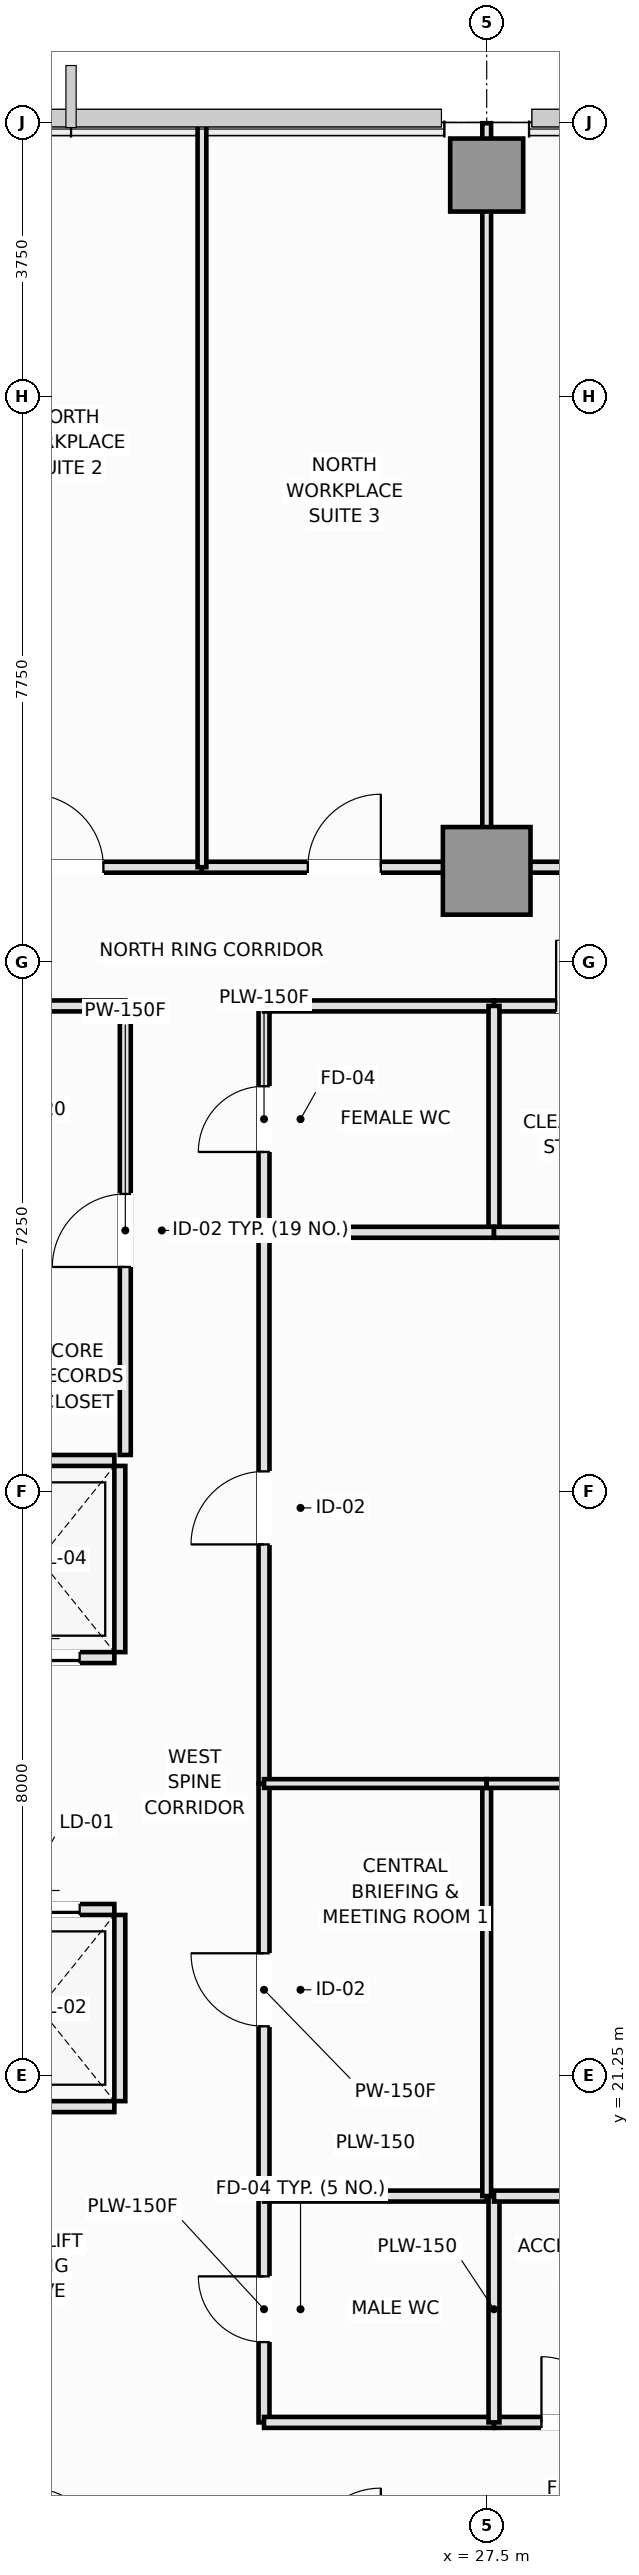
"""IFC4 building model, lengths in metres.
Left out: names, types, materials, properties, quantities, classifications, styles, units other than length and angle.
Written with IfcOpenShell. Run it as: python <this file> out.ifc"""

import sys

from ifc_helpers import new_model, si_unit, direction, frame, frame_2d, origin, origin_2d, place, context, subcontext, project, spatial, rectangle, extrude, element, fill, save


model = new_model("IFC4")
c1 = context("Model", 3, precision=1e-05, world=origin(), true_north=direction((0.0, 1.0)))
c2 = subcontext(c1, "Body", "Model", "MODEL_VIEW")
j1 = project(units=[si_unit("LENGTHUNIT", "METRE"), si_unit("PLANEANGLEUNIT", "RADIAN")], contexts=[c1])
p1 = place(None, origin())
s1 = spatial("IfcSite", under=j1, at=p1, CompositionType="ELEMENT")
p2 = place(p1, origin())
s2 = spatial("IfcBuilding", under=s1, at=p2, CompositionType="ELEMENT")
p3 = place(p2, frame((0.0, 0.0, 57.55)))
s3 = spatial("IfcBuildingStorey", under=s2, at=p3, CompositionType="ELEMENT", Elevation=57.55)
p4 = place(p3, frame((27.5, 37.75, 0.0), z_axis=(0.0, 0.0, 1.0), x_axis=(1.0, 0.0, 0.0)))
e1 = element("IfcColumn", 1, at=p4, inside=s3, PredefinedType="COLUMN", context=c2, shape_type="SweptSolid", body=[
    extrude(rectangle(XDim=1.2, YDim=1.2, at=origin_2d()), origin(), (0.0, 0.0, 1.0), 3.55),
])
p5 = place(p3, frame((27.5, 47.28, 0.0), z_axis=(0.0, 0.0, 1.0), x_axis=(1.0, 0.0, 0.0)))
e2 = element("IfcColumn", 2, at=p5, inside=s3, PredefinedType="COLUMN", context=c2, shape_type="SweptSolid", body=[
    extrude(rectangle(XDim=1.0, YDim=1.0, at=origin_2d()), origin(), (0.0, 0.0, 1.0), 3.55),
])
p6 = place(p3, frame((20.35, 20.825, 0.0), z_axis=(0.0, 0.0, 1.0), x_axis=(1.0, 0.0, 0.0)))
e3 = element("IfcWall", 3, at=p6, inside=s3, PredefinedType="PARTITIONING", context=c2, shape_type="SweptSolid", body=[
    extrude(rectangle(XDim=2.05, YDim=0.15, at=frame_2d((1.025, 0.0))), origin(), (0.0, 0.0, 1.0), 3.37),
])
p7 = place(p3, frame((20.35, 23.525, 0.0), z_axis=(0.0, 0.0, 1.0), x_axis=(1.0, 0.0, 0.0)))
e4 = element("IfcWall", 4, at=p7, inside=s3, PredefinedType="PARTITIONING", context=c2, shape_type="SweptSolid", body=[
    extrude(rectangle(XDim=2.05, YDim=0.15, at=frame_2d((1.025, 0.0))), origin(), (0.0, 0.0, 1.0), 3.37),
])
p8 = place(p7, frame((0.475, 0.0, 0.0)))
e5 = element("IfcOpeningElement", 5, at=p8, cuts=e4, PredefinedType="OPENING", context=c2, shape_type="SweptSolid", body=[
    extrude(rectangle(XDim=1.1, YDim=2.2, at=frame_2d((0.55, 1.1))), frame((0.0, 0.085, 0.0), z_axis=(0.0, -1.0, 0.0), x_axis=(1.0, 0.0, 0.0)), (0.0, 0.0, 1.0), 0.17),
])
p9 = place(p3, frame((22.475, 20.9, 0.0), z_axis=(0.0, 0.0, 1.0), x_axis=(0.0, 1.0, 0.0)))
e6 = element("IfcWall", 6, at=p9, inside=s3, PredefinedType="PARTITIONING", context=c2, shape_type="SweptSolid", body=[
    extrude(rectangle(XDim=2.55, YDim=0.15, at=frame_2d((1.275, 0.0))), origin(), (0.0, 0.0, 1.0), 3.37),
])
p10 = place(p3, frame((20.35, 26.975, 0.0), z_axis=(0.0, 0.0, 1.0), x_axis=(1.0, 0.0, 0.0)))
e7 = element("IfcWall", 7, at=p10, inside=s3, PredefinedType="PARTITIONING", context=c2, shape_type="SweptSolid", body=[
    extrude(rectangle(XDim=2.05, YDim=0.15, at=frame_2d((1.025, 0.0))), origin(), (0.0, 0.0, 1.0), 3.37),
])
p11 = place(p10, frame((0.475, 0.0, 0.0)))
e8 = element("IfcOpeningElement", 8, at=p11, cuts=e7, PredefinedType="OPENING", context=c2, shape_type="SweptSolid", body=[
    extrude(rectangle(XDim=1.1, YDim=2.2, at=frame_2d((0.55, 1.1))), frame((0.0, 0.085, 0.0), z_axis=(0.0, -1.0, 0.0), x_axis=(1.0, 0.0, 0.0)), (0.0, 0.0, 1.0), 0.17),
])
p12 = place(p3, frame((20.35, 29.675, 0.0), z_axis=(0.0, 0.0, 1.0), x_axis=(1.0, 0.0, 0.0)))
e9 = element("IfcWall", 9, at=p12, inside=s3, PredefinedType="PARTITIONING", context=c2, shape_type="SweptSolid", body=[
    extrude(rectangle(XDim=2.05, YDim=0.15, at=frame_2d((1.025, 0.0))), origin(), (0.0, 0.0, 1.0), 3.37),
])
p13 = place(p3, frame((22.475, 27.05, 0.0), z_axis=(0.0, 0.0, 1.0), x_axis=(0.0, 1.0, 0.0)))
e10 = element("IfcWall", 10, at=p13, inside=s3, PredefinedType="PARTITIONING", context=c2, shape_type="SweptSolid", body=[
    extrude(rectangle(XDim=2.55, YDim=0.15, at=frame_2d((1.275, 0.0))), origin(), (0.0, 0.0, 1.0), 3.37),
])
p14 = place(p3, frame((22.55, 29.75, 0.0), z_axis=(0.0, 0.0, 1.0), x_axis=(0.0, 1.0, 0.0)))
e11 = element("IfcWall", 11, at=p14, inside=s3, PredefinedType="PARTITIONING", context=c2, shape_type="SweptSolid", body=[
    extrude(rectangle(XDim=6.15, YDim=0.15, at=frame_2d((3.075, 0.0))), origin(), (0.0, 0.0, 1.0), 3.01),
])
p15 = place(p14, frame((2.575, 0.0, 0.0)))
e12 = element("IfcOpeningElement", 12, at=p15, cuts=e11, PredefinedType="OPENING", context=c2, shape_type="SweptSolid", body=[
    extrude(rectangle(XDim=1.0, YDim=2.15, at=frame_2d((0.5, 1.075))), frame((0.0, 0.085, 0.0), z_axis=(0.0, -1.0, 0.0), x_axis=(1.0, 0.0, 0.0)), (0.0, 0.0, 1.0), 0.17),
])
p16 = place(p3, frame((24.45, 16.5, 0.0), z_axis=(0.0, 0.0, 1.0), x_axis=(0.0, 1.0, 0.0)))
e13 = element("IfcWall", 13, at=p16, inside=s3, PredefinedType="PLUMBINGWALL", context=c2, shape_type="SweptSolid", body=[
    extrude(rectangle(XDim=3.1, YDim=0.15, at=frame_2d((1.55, 0.0))), origin(), (0.0, 0.0, 1.0), 3.37),
])
p17 = place(p16, frame((1.1, 0.0, 0.0)))
e14 = element("IfcOpeningElement", 14, at=p17, cuts=e13, PredefinedType="OPENING", context=c2, shape_type="SweptSolid", body=[
    extrude(rectangle(XDim=0.9, YDim=2.1, at=frame_2d((0.45, 1.05))), frame((0.0, 0.085, 0.0), z_axis=(0.0, -1.0, 0.0), x_axis=(1.0, 0.0, 0.0)), (0.0, 0.0, 1.0), 0.17),
])
p18 = place(p3, frame((24.45, 32.8, 0.0), z_axis=(0.0, 0.0, 1.0), x_axis=(0.0, 1.0, 0.0)))
e15 = element("IfcWall", 15, at=p18, inside=s3, PredefinedType="PLUMBINGWALL", context=c2, shape_type="SweptSolid", body=[
    extrude(rectangle(XDim=3.1, YDim=0.15, at=frame_2d((1.55, 0.0))), origin(), (0.0, 0.0, 1.0), 3.37),
])
p19 = place(p18, frame((1.1, 0.0, 0.0)))
e16 = element("IfcOpeningElement", 16, at=p19, cuts=e15, PredefinedType="OPENING", context=c2, shape_type="SweptSolid", body=[
    extrude(rectangle(XDim=0.9, YDim=2.1, at=frame_2d((0.45, 1.05))), frame((0.0, 0.085, 0.0), z_axis=(0.0, -1.0, 0.0), x_axis=(1.0, 0.0, 0.0)), (0.0, 0.0, 1.0), 0.17),
])
p20 = place(p3, frame((24.45, 19.6, 0.0), z_axis=(0.0, 0.0, 1.0), x_axis=(0.0, 1.0, 0.0)))
e17 = element("IfcWall", 17, at=p20, inside=s3, PredefinedType="PARTITIONING", context=c2, shape_type="SweptSolid", body=[
    extrude(rectangle(XDim=5.65, YDim=0.15, at=frame_2d((2.825, 0.0))), origin(), (0.0, 0.0, 1.0), 3.37),
])
p21 = place(p20, frame((2.325, 0.0, 0.0)))
e18 = element("IfcOpeningElement", 18, at=p21, cuts=e17, PredefinedType="OPENING", context=c2, shape_type="SweptSolid", body=[
    extrude(rectangle(XDim=1.0, YDim=2.15, at=frame_2d((0.5, 1.075))), frame((0.0, 0.085, 0.0), z_axis=(0.0, -1.0, 0.0), x_axis=(1.0, 0.0, 0.0)), (0.0, 0.0, 1.0), 0.17),
])
p22 = place(p3, frame((24.45, 25.25, 0.0), z_axis=(0.0, 0.0, 1.0), x_axis=(0.0, 1.0, 0.0)))
e19 = element("IfcWall", 19, at=p22, inside=s3, PredefinedType="PARTITIONING", context=c2, shape_type="SweptSolid", body=[
    extrude(rectangle(XDim=7.55, YDim=0.15, at=frame_2d((3.775, 0.0))), origin(), (0.0, 0.0, 1.0), 3.37),
])
p23 = place(p22, frame((3.275, 0.0, 0.0)))
e20 = element("IfcOpeningElement", 20, at=p23, cuts=e19, PredefinedType="OPENING", context=c2, shape_type="SweptSolid", body=[
    extrude(rectangle(XDim=1.0, YDim=2.15, at=frame_2d((0.5, 1.075))), frame((0.0, 0.085, 0.0), z_axis=(0.0, -1.0, 0.0), x_axis=(1.0, 0.0, 0.0)), (0.0, 0.0, 1.0), 0.17),
])
p24 = place(p3, frame((24.45, 16.5, 0.0), z_axis=(0.0, 0.0, 1.0), x_axis=(1.0, 0.0, 0.0)))
e21 = element("IfcWall", 21, at=p24, inside=s3, PredefinedType="PLUMBINGWALL", context=c2, shape_type="SweptSolid", body=[
    extrude(rectangle(XDim=3.15, YDim=0.15, at=frame_2d((1.575, 0.0))), origin(), (0.0, 0.0, 1.0), 3.37),
])
p25 = place(p3, frame((27.6, 16.5, 0.0), z_axis=(0.0, 0.0, 1.0), x_axis=(1.0, 0.0, 0.0)))
e22 = element("IfcWall", 22, at=p25, inside=s3, PredefinedType="PLUMBINGWALL", context=c2, shape_type="SweptSolid", body=[
    extrude(rectangle(XDim=2.2, YDim=0.15, at=frame_2d((1.1, 0.0))), origin(), (0.0, 0.0, 1.0), 3.37),
])
p26 = place(p25, frame((0.65, 0.0, 0.0)))
e23 = element("IfcOpeningElement", 23, at=p26, cuts=e22, PredefinedType="OPENING", context=c2, shape_type="SweptSolid", body=[
    extrude(rectangle(XDim=0.9, YDim=2.1, at=frame_2d((0.45, 1.05))), frame((0.0, 0.085, 0.0), z_axis=(0.0, -1.0, 0.0), x_axis=(1.0, 0.0, 0.0)), (0.0, 0.0, 1.0), 0.17),
])
p27 = place(p3, frame((21.25, 35.9, 0.0), z_axis=(0.0, 0.0, 1.0), x_axis=(1.0, 0.0, 0.0)))
e24 = element("IfcWall", 24, at=p27, inside=s3, PredefinedType="PARTITIONING", context=c2, shape_type="SweptSolid", body=[
    extrude(rectangle(XDim=1.3, YDim=0.15, at=frame_2d((0.65, 0.0))), origin(), (0.0, 0.0, 1.0), 3.37),
])
p28 = place(p3, frame((24.45, 35.9, 0.0), z_axis=(0.0, 0.0, 1.0), x_axis=(1.0, 0.0, 0.0)))
e25 = element("IfcWall", 25, at=p28, inside=s3, PredefinedType="PLUMBINGWALL", context=c2, shape_type="SweptSolid", body=[
    extrude(rectangle(XDim=3.15, YDim=0.15, at=frame_2d((1.575, 0.0))), origin(), (0.0, 0.0, 1.0), 3.37),
])
p29 = place(p3, frame((27.6, 35.9, 0.0), z_axis=(0.0, 0.0, 1.0), x_axis=(1.0, 0.0, 0.0)))
e26 = element("IfcWall", 26, at=p29, inside=s3, PredefinedType="PLUMBINGWALL", context=c2, shape_type="SweptSolid", body=[
    extrude(rectangle(XDim=2.2, YDim=0.15, at=frame_2d((1.1, 0.0))), origin(), (0.0, 0.0, 1.0), 3.37),
])
p30 = place(p29, frame((0.851, 0.0, 0.0)))
e27 = element("IfcOpeningElement", 27, at=p30, cuts=e26, PredefinedType="OPENING", context=c2, shape_type="SweptSolid", body=[
    extrude(rectangle(XDim=0.9, YDim=2.1, at=frame_2d((0.45, 1.05))), frame((0.0, 0.085, 0.0), z_axis=(0.0, -1.0, 0.0), x_axis=(1.0, 0.0, 0.0)), (0.0, 0.0, 1.0), 0.17),
])
p31 = place(p3, frame((19.9, 37.8, 0.0), z_axis=(0.0, 0.0, 1.0), x_axis=(1.0, 0.0, 0.0)))
e28 = element("IfcWall", 28, at=p31, inside=s3, PredefinedType="PARTITIONING", context=c2, shape_type="SweptSolid", body=[
    extrude(rectangle(XDim=3.7, YDim=0.15, at=frame_2d((1.85, 0.0))), origin(), (0.0, 0.0, 1.0), 2.72),
])
p32 = place(p31, frame((1.35, 0.0, 0.0)))
e29 = element("IfcOpeningElement", 29, at=p32, cuts=e28, PredefinedType="OPENING", context=c2, shape_type="SweptSolid", body=[
    extrude(rectangle(XDim=1.0, YDim=2.15, at=frame_2d((0.5, 1.075))), frame((0.0, 0.085, 0.0), z_axis=(0.0, -1.0, 0.0), x_axis=(1.0, 0.0, 0.0)), (0.0, 0.0, 1.0), 0.17),
])
p33 = place(p3, frame((23.6, 37.8, 0.0), z_axis=(0.0, 0.0, 1.0), x_axis=(1.0, 0.0, 0.0)))
e30 = element("IfcWall", 30, at=p33, inside=s3, PredefinedType="PARTITIONING", context=c2, shape_type="SweptSolid", body=[
    extrude(rectangle(XDim=3.9, YDim=0.15, at=frame_2d((1.95, 0.0))), origin(), (0.0, 0.0, 1.0), 2.72),
])
p34 = place(p33, frame((1.45, 0.0, 0.0)))
e31 = element("IfcOpeningElement", 31, at=p34, cuts=e30, PredefinedType="OPENING", context=c2, shape_type="SweptSolid", body=[
    extrude(rectangle(XDim=1.0, YDim=2.15, at=frame_2d((0.5, 1.075))), frame((0.0, 0.085, 0.0), z_axis=(0.0, -1.0, 0.0), x_axis=(1.0, 0.0, 0.0)), (0.0, 0.0, 1.0), 0.17),
])
p35 = place(p3, frame((27.5, 37.8, 0.0), z_axis=(0.0, 0.0, 1.0), x_axis=(1.0, 0.0, 0.0)))
e32 = element("IfcWall", 32, at=p35, inside=s3, PredefinedType="PARTITIONING", context=c2, shape_type="SweptSolid", body=[
    extrude(rectangle(XDim=5.5, YDim=0.15, at=frame_2d((2.75, 0.0))), origin(), (0.0, 0.0, 1.0), 2.72),
])
p36 = place(p35, frame((2.25, 0.0, 0.0)))
e33 = element("IfcOpeningElement", 33, at=p36, cuts=e32, PredefinedType="OPENING", context=c2, shape_type="SweptSolid", body=[
    extrude(rectangle(XDim=1.0, YDim=2.15, at=frame_2d((0.5, 1.075))), frame((0.0, 0.085, 0.0), z_axis=(0.0, -1.0, 0.0), x_axis=(1.0, 0.0, 0.0)), (0.0, 0.0, 1.0), 0.17),
])
p37 = place(p3, frame((27.6, 16.5, 0.0), z_axis=(0.0, 0.0, 1.0), x_axis=(0.0, 1.0, 0.0)))
e34 = element("IfcWall", 34, at=p37, inside=s3, PredefinedType="PLUMBINGWALL", context=c2, shape_type="SweptSolid", body=[
    extrude(rectangle(XDim=3.1, YDim=0.15, at=frame_2d((1.55, 0.0))), origin(), (0.0, 0.0, 1.0), 3.37),
])
p38 = place(p3, frame((24.45, 19.6, 0.0), z_axis=(0.0, 0.0, 1.0), x_axis=(1.0, 0.0, 0.0)))
e35 = element("IfcWall", 35, at=p38, inside=s3, PredefinedType="PLUMBINGWALL", context=c2, shape_type="SweptSolid", body=[
    extrude(rectangle(XDim=3.05, YDim=0.15, at=frame_2d((1.525, 0.0))), origin(), (0.0, 0.0, 1.0), 3.37),
])
p39 = place(p3, frame((27.6, 32.8, 0.0), z_axis=(0.0, 0.0, 1.0), x_axis=(0.0, 1.0, 0.0)))
e36 = element("IfcWall", 36, at=p39, inside=s3, PredefinedType="PLUMBINGWALL", context=c2, shape_type="SweptSolid", body=[
    extrude(rectangle(XDim=3.1, YDim=0.15, at=frame_2d((1.55, 0.0))), origin(), (0.0, 0.0, 1.0), 3.37),
])
p40 = place(p3, frame((24.45, 32.8, 0.0), z_axis=(0.0, 0.0, 1.0), x_axis=(1.0, 0.0, 0.0)))
e37 = element("IfcWall", 37, at=p40, inside=s3, PredefinedType="PLUMBINGWALL", context=c2, shape_type="SweptSolid", body=[
    extrude(rectangle(XDim=3.15, YDim=0.15, at=frame_2d((1.575, 0.0))), origin(), (0.0, 0.0, 1.0), 3.37),
])
for number, where, z_axis, x_axis in (
    (38, (27.6, 19.6, 0.0), (0.0, 0.0, 1.0), (1.0, 0.0, 0.0)),
    (39, (27.6, 32.8, 0.0), (0.0, 0.0, 1.0), (1.0, 0.0, 0.0)),
):
    element("IfcWall", number, at=place(p3, frame(where, z_axis=z_axis, x_axis=x_axis)), inside=s3, PredefinedType="PLUMBINGWALL", context=c2, shape_type="SweptSolid", body=[
        extrude(rectangle(XDim=2.2, YDim=0.15, at=frame_2d((1.1, 0.0))), origin(), (0.0, 0.0, 1.0), 3.37),
    ])
p41 = place(p3, frame((27.5, 19.6, 0.0), z_axis=(0.0, 0.0, 1.0), x_axis=(0.0, 1.0, 0.0)))
e40 = element("IfcWall", 40, at=p41, inside=s3, PredefinedType="PARTITIONING", context=c2, shape_type="SweptSolid", body=[
    extrude(rectangle(XDim=5.65, YDim=0.12, at=frame_2d((2.825, 0.0))), origin(), (0.0, 0.0, 1.0), 3.37),
])
p42 = place(p3, frame((24.45, 25.25, 0.0), z_axis=(0.0, 0.0, 1.0), x_axis=(1.0, 0.0, 0.0)))
e41 = element("IfcWall", 41, at=p42, inside=s3, PredefinedType="PARTITIONING", context=c2, shape_type="SweptSolid", body=[
    extrude(rectangle(XDim=3.05, YDim=0.12, at=frame_2d((1.525, 0.0))), origin(), (0.0, 0.0, 1.0), 2.72),
])
p43 = place(p3, frame((27.5, 25.25, 0.0), z_axis=(0.0, 0.0, 1.0), x_axis=(1.0, 0.0, 0.0)))
e42 = element("IfcWall", 42, at=p43, inside=s3, PredefinedType="PARTITIONING", context=c2, shape_type="SweptSolid", body=[
    extrude(rectangle(XDim=8.8, YDim=0.12, at=frame_2d((4.4, 0.0))), origin(), (0.0, 0.0, 1.0), 2.72),
])
p44 = place(p3, frame((23.6, 37.8, 0.0), z_axis=(0.0, 0.0, 1.0), x_axis=(0.0, 1.0, 0.0)))
e43 = element("IfcWall", 43, at=p44, inside=s3, PredefinedType="PARTITIONING", context=c2, shape_type="SweptSolid", body=[
    extrude(rectangle(XDim=10.19, YDim=0.12, at=frame_2d((5.095, 0.0))), origin(), (0.0, 0.0, 1.0), 3.37),
])
p45 = place(p3, frame((27.5, 37.8, 0.0), z_axis=(0.0, 0.0, 1.0), x_axis=(0.0, 1.0, 0.0)))
e44 = element("IfcWall", 44, at=p45, inside=s3, PredefinedType="PARTITIONING", context=c2, shape_type="SweptSolid", body=[
    extrude(rectangle(XDim=10.19, YDim=0.12, at=frame_2d((5.095, 0.0))), origin(), (0.0, 0.0, 1.0), 2.82),
])
p46 = place(p8, origin())
e45 = element("IfcDoor", 45, at=p46, inside=s3, OperationType="DOUBLE_DOOR_SLIDING", PredefinedType="DOOR", context=c2, shape_type="SweptSolid", body=[
    extrude(rectangle(XDim=1.1, YDim=2.2, at=frame_2d((0.55, 1.1))), frame((0.0, 0.025, 0.0), z_axis=(0.0, -1.0, 0.0), x_axis=(1.0, 0.0, 0.0)), (0.0, 0.0, 1.0), 0.05),
])
fill(e5, e45)
p47 = place(p11, origin())
e46 = element("IfcDoor", 46, at=p47, inside=s3, OperationType="DOUBLE_DOOR_SLIDING", PredefinedType="DOOR", context=c2, shape_type="SweptSolid", body=[
    extrude(rectangle(XDim=1.1, YDim=2.2, at=frame_2d((0.55, 1.1))), frame((0.0, 0.025, 0.0), z_axis=(0.0, -1.0, 0.0), x_axis=(1.0, 0.0, 0.0)), (0.0, 0.0, 1.0), 0.05),
])
fill(e8, e46)
p48 = place(p15, origin())
e47 = element("IfcDoor", 47, at=p48, inside=s3, OperationType="SINGLE_SWING_LEFT", PredefinedType="DOOR", context=c2, shape_type="SweptSolid", body=[
    extrude(rectangle(XDim=1.0, YDim=2.15, at=frame_2d((0.5, 1.075))), frame((0.0, 0.025, 0.0), z_axis=(0.0, -1.0, 0.0), x_axis=(1.0, 0.0, 0.0)), (0.0, 0.0, 1.0), 0.05),
])
fill(e12, e47)
p49 = place(p17, origin())
e48 = element("IfcDoor", 48, at=p49, inside=s3, OperationType="SINGLE_SWING_RIGHT", PredefinedType="DOOR", context=c2, shape_type="SweptSolid", body=[
    extrude(rectangle(XDim=0.9, YDim=2.1, at=frame_2d((0.45, 1.05))), frame((0.0, 0.025, 0.0), z_axis=(0.0, -1.0, 0.0), x_axis=(1.0, 0.0, 0.0)), (0.0, 0.0, 1.0), 0.05),
])
fill(e14, e48)
p50 = place(p19, origin())
e49 = element("IfcDoor", 49, at=p50, inside=s3, OperationType="SINGLE_SWING_LEFT", PredefinedType="DOOR", context=c2, shape_type="SweptSolid", body=[
    extrude(rectangle(XDim=0.9, YDim=2.1, at=frame_2d((0.45, 1.05))), frame((0.0, 0.025, 0.0), z_axis=(0.0, -1.0, 0.0), x_axis=(1.0, 0.0, 0.0)), (0.0, 0.0, 1.0), 0.05),
])
fill(e16, e49)
p51 = place(p21, origin())
e50 = element("IfcDoor", 50, at=p51, inside=s3, OperationType="SINGLE_SWING_RIGHT", PredefinedType="DOOR", context=c2, shape_type="SweptSolid", body=[
    extrude(rectangle(XDim=1.0, YDim=2.15, at=frame_2d((0.5, 1.075))), frame((0.0, 0.025, 0.0), z_axis=(0.0, -1.0, 0.0), x_axis=(1.0, 0.0, 0.0)), (0.0, 0.0, 1.0), 0.05),
])
fill(e18, e50)
p52 = place(p23, origin())
e51 = element("IfcDoor", 51, at=p52, inside=s3, OperationType="SINGLE_SWING_LEFT", PredefinedType="DOOR", context=c2, shape_type="SweptSolid", body=[
    extrude(rectangle(XDim=1.0, YDim=2.15, at=frame_2d((0.5, 1.075))), frame((0.0, 0.025, 0.0), z_axis=(0.0, -1.0, 0.0), x_axis=(1.0, 0.0, 0.0)), (0.0, 0.0, 1.0), 0.05),
])
fill(e20, e51)
p53 = place(p26, origin())
e52 = element("IfcDoor", 52, at=p53, inside=s3, OperationType="SINGLE_SWING_LEFT", PredefinedType="DOOR", context=c2, shape_type="SweptSolid", body=[
    extrude(rectangle(XDim=0.9, YDim=2.1, at=frame_2d((0.45, 1.05))), frame((0.0, 0.025, 0.0), z_axis=(0.0, -1.0, 0.0), x_axis=(1.0, 0.0, 0.0)), (0.0, 0.0, 1.0), 0.05),
])
fill(e23, e52)
p54 = place(p30, origin())
e53 = element("IfcDoor", 53, at=p54, inside=s3, OperationType="SINGLE_SWING_LEFT", PredefinedType="DOOR", context=c2, shape_type="SweptSolid", body=[
    extrude(rectangle(XDim=0.9, YDim=2.1, at=frame_2d((0.45, 1.05))), frame((0.0, 0.025, 0.0), z_axis=(0.0, -1.0, 0.0), x_axis=(1.0, 0.0, 0.0)), (0.0, 0.0, 1.0), 0.05),
])
fill(e27, e53)
p55 = place(p32, origin())
e54 = element("IfcDoor", 54, at=p55, inside=s3, OperationType="SINGLE_SWING_LEFT", PredefinedType="DOOR", context=c2, shape_type="SweptSolid", body=[
    extrude(rectangle(XDim=1.0, YDim=2.15, at=frame_2d((0.5, 1.075))), frame((0.0, 0.025, 0.0), z_axis=(0.0, -1.0, 0.0), x_axis=(1.0, 0.0, 0.0)), (0.0, 0.0, 1.0), 0.05),
])
fill(e29, e54)
p56 = place(p34, origin())
e55 = element("IfcDoor", 55, at=p56, inside=s3, OperationType="SINGLE_SWING_RIGHT", PredefinedType="DOOR", context=c2, shape_type="SweptSolid", body=[
    extrude(rectangle(XDim=1.0, YDim=2.15, at=frame_2d((0.5, 1.075))), frame((0.0, 0.025, 0.0), z_axis=(0.0, -1.0, 0.0), x_axis=(1.0, 0.0, 0.0)), (0.0, 0.0, 1.0), 0.05),
])
fill(e31, e55)
save(model, sys.argv[1])
